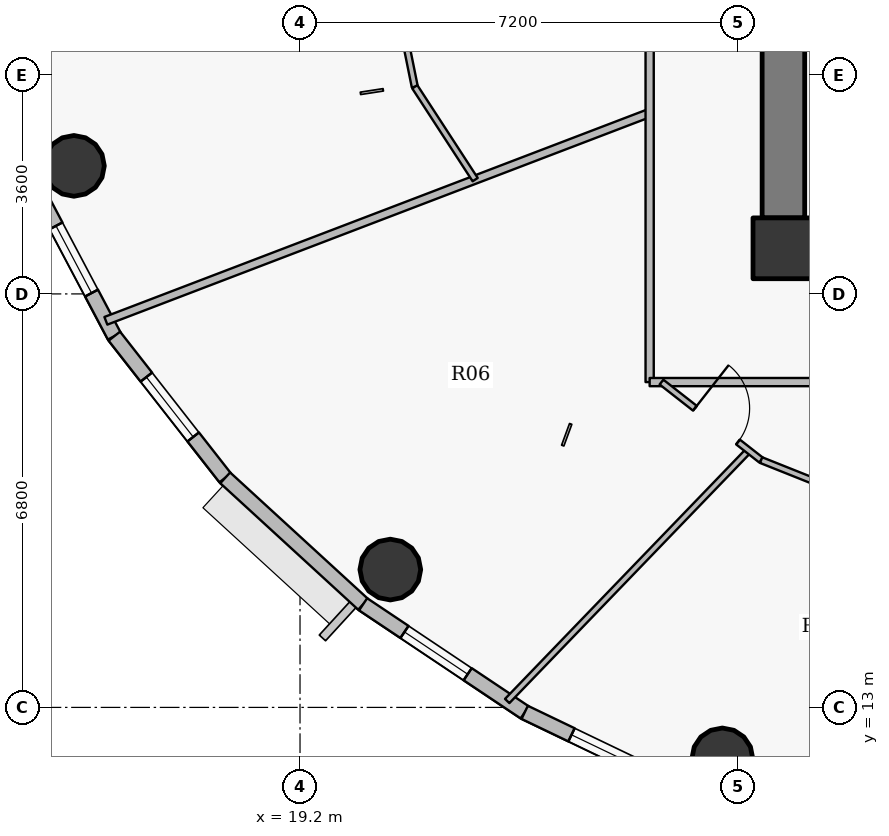
"""IFC4 building model, lengths in metres.
Left out: names, types, materials, properties, quantities, classifications, styles, units other than length and angle.
Written with IfcOpenShell. Run it as: python <this file> out.ifc"""

import sys

from ifc_helpers import new_model, si_unit, direction, frame, frame_2d, origin, origin_2d, place, context, subcontext, project, spatial, rectangle, hollow_circle, extrude, source, transform, mapped, element, fill, save


model = new_model("IFC4")
c1 = context("Model", 3, precision=1e-05, world=origin(), true_north=direction((0.0, 1.0)))
c2 = subcontext(c1, "Body", "Model", "MODEL_VIEW")
j1 = project(units=[si_unit("LENGTHUNIT", "METRE"), si_unit("PLANEANGLEUNIT", "RADIAN")], contexts=[c1])
p1 = place(None, origin())
s1 = spatial("IfcSite", under=j1, at=p1, CompositionType="ELEMENT")
p2 = place(p1, origin())
s2 = spatial("IfcBuilding", under=s1, at=p2, CompositionType="ELEMENT")
p3 = place(p2, frame((0.0, 0.0, 291.75)))
s3 = spatial("IfcBuildingStorey", under=s2, at=p3, CompositionType="ELEMENT", Elevation=291.75)
p4 = place(p3, frame((27.15, 20.55, 0.0), z_axis=(0.0, 0.0, 1.0), x_axis=(1.0, 0.0, 0.0)))
e1 = element("IfcColumn", 1, at=p4, inside=s3, PredefinedType="COLUMN", context=c2, shape_type="SweptSolid", body=[
    extrude(rectangle(XDim=1.0, YDim=1.0, at=origin_2d()), origin(), (0.0, 0.0, 1.0), 3.75),
])
p5 = place(p3, frame((27.15, 21.05, 0.0), z_axis=(0.0, 0.0, 1.0), x_axis=(0.0, 1.0, 0.0)))
e2 = element("IfcWall", 2, at=p5, inside=s3, PredefinedType="SHEAR", context=c2, shape_type="SweptSolid", body=[
    extrude(rectangle(XDim=11.9, YDim=0.7, at=frame_2d((5.95, 0.0))), origin(), (0.0, 0.0, 1.0), 3.05),
])
for number, where, z_axis, x_axis in (
    (3, (15.481, 21.906, 0.0), (0.0, 0.0, 1.0), (1.0, 0.0, 0.0)),
    (4, (20.685, 15.267, 0.0), (0.0, 0.0, 1.0), (1.0, 0.0, 0.0)),
    (5, (26.146, 12.161, 0.0), (0.0, 0.0, 1.0), (1.0, 0.0, 0.0)),
):
    element("IfcColumn", number, at=place(p3, frame(where, z_axis=z_axis, x_axis=x_axis)), inside=s3, PredefinedType="COLUMN", context=c2, shape_type="SweptSolid", body=[
        extrude(hollow_circle(Radius=0.5, WallThickness=0.032, at=origin_2d()), origin(), (0.0, 0.0, 1.0), 3.75),
    ])
p6 = place(p3, frame((16.146, 19.105, 0.0), z_axis=(0.0, 0.0, 1.0), x_axis=(-0.467628269026, 0.883925224218, 0.0)))
e6 = element("IfcWall", 6, at=p6, inside=s3, PredefinedType="SOLIDWALL", context=c2, shape_type="SweptSolid", body=[
    extrude(rectangle(XDim=2.854, YDim=0.24, at=frame_2d((1.427, 0.0))), origin(), (0.0, 0.0, 1.0), 3.5),
])
p7 = place(p6, frame((0.802, 0.0, 0.9)))
e7 = element("IfcOpeningElement", 7, at=p7, cuts=e6, PredefinedType="OPENING", context=c2, shape_type="SweptSolid", body=[
    extrude(rectangle(XDim=1.25, YDim=1.65, at=origin_2d()), frame((0.625, 0.13, 0.825), z_axis=(0.0, -1.0, 0.0), x_axis=(1.0, 0.0, 0.0)), (0.0, 0.0, 1.0), 0.26),
])
p8 = place(p3, frame((17.97, 16.775, 0.0), z_axis=(0.0, 0.0, 1.0), x_axis=(-0.616337186556, 0.787482363275, 0.0)))
e8 = element("IfcWall", 8, at=p8, inside=s3, PredefinedType="SOLIDWALL", context=c2, shape_type="SweptSolid", body=[
    extrude(rectangle(XDim=2.958, YDim=0.24, at=frame_2d((1.479, 0.0))), origin(), (0.0, 0.0, 1.0), 3.5),
])
p9 = place(p8, frame((0.854, 0.0, 0.9)))
e9 = element("IfcOpeningElement", 9, at=p9, cuts=e8, PredefinedType="OPENING", context=c2, shape_type="SweptSolid", body=[
    extrude(rectangle(XDim=1.25, YDim=1.65, at=origin_2d()), frame((0.625, 0.13, 0.825), z_axis=(0.0, -1.0, 0.0), x_axis=(1.0, 0.0, 0.0)), (0.0, 0.0, 1.0), 0.26),
])
p10 = place(p3, frame((20.238, 14.696, 0.0), z_axis=(0.0, 0.0, 1.0), x_axis=(-0.737068506972, 0.675818034703, 0.0)))
e10 = element("IfcWall", 10, at=p10, inside=s3, PredefinedType="SOLIDWALL", context=c2, shape_type="SweptSolid", body=[
    extrude(rectangle(XDim=3.077, YDim=0.24, at=frame_2d((1.539, 0.0))), origin(), (0.0, 0.0, 1.0), 3.5),
])
p11 = place(p3, frame((22.896, 12.918, 0.0), z_axis=(0.0, 0.0, 1.0), x_axis=(-0.831250592635, 0.55589787933, 0.0)))
e11 = element("IfcWall", 11, at=p11, inside=s3, PredefinedType="SOLIDWALL", context=c2, shape_type="SweptSolid", body=[
    extrude(rectangle(XDim=3.197, YDim=0.24, at=frame_2d((1.599, 0.0))), origin(), (0.0, 0.0, 1.0), 3.5),
])
p12 = place(p11, frame((1.129, 0.0, 0.9)))
e12 = element("IfcOpeningElement", 12, at=p12, cuts=e11, PredefinedType="OPENING", context=c2, shape_type="SweptSolid", body=[
    extrude(rectangle(XDim=1.25, YDim=1.65, at=origin_2d()), frame((0.625, 0.13, 0.825), z_axis=(0.0, -1.0, 0.0), x_axis=(1.0, 0.0, 0.0)), (0.0, 0.0, 1.0), 0.26),
])
p13 = place(p3, frame((25.877, 11.488, 0.0), z_axis=(0.0, 0.0, 1.0), x_axis=(-0.901573741254, 0.43262546051, 0.0)))
e13 = element("IfcWall", 13, at=p13, inside=s3, PredefinedType="SOLIDWALL", context=c2, shape_type="SweptSolid", body=[
    extrude(rectangle(XDim=3.307, YDim=0.24, at=frame_2d((1.653, 0.0))), origin(), (0.0, 0.0, 1.0), 3.5),
])
p14 = place(p13, frame((0.853, 0.0, 0.9)))
e14 = element("IfcOpeningElement", 14, at=p14, cuts=e13, PredefinedType="OPENING", context=c2, shape_type="SweptSolid", body=[
    extrude(rectangle(XDim=1.6, YDim=1.75, at=origin_2d()), frame((0.8, 0.13, 0.875), z_axis=(0.0, -1.0, 0.0), x_axis=(1.0, 0.0, 0.0)), (0.0, 0.0, 1.0), 0.26),
])
p15 = place(p3, frame((16.007, 19.358, 0.0), z_axis=(0.0, 0.0, 1.0), x_axis=(0.934094110355, 0.35702687994, 0.0)))
e15 = element("IfcWall", 15, at=p15, inside=s3, PredefinedType="PARTITIONING", context=c2, shape_type="SweptSolid", body=[
    extrude(rectangle(XDim=9.574, YDim=0.135, at=frame_2d((4.787, 0.0))), origin(), (0.0, 0.0, 1.0), 2.985),
])
p16 = place(p3, frame((20.32, 27.0, 0.0), z_axis=(0.0, 0.0, 1.0), x_axis=(0.198226068862, -0.980156327135, 0.0)))
e16 = element("IfcWall", 16, at=p16, inside=s3, PredefinedType="PARTITIONING", context=c2, shape_type="SweptSolid", body=[
    extrude(rectangle(XDim=3.871, YDim=0.1, at=frame_2d((1.936, 0.0))), origin(), (0.0, 0.0, 1.0), 3.035),
])
p17 = place(p3, frame((21.087, 23.206, 0.0), z_axis=(0.0, 0.0, 1.0), x_axis=(0.545384128846, -0.838186227519, 0.0)))
e17 = element("IfcWall", 17, at=p17, inside=s3, PredefinedType="PARTITIONING", context=c2, shape_type="SweptSolid", body=[
    extrude(rectangle(XDim=1.821, YDim=0.1, at=frame_2d((0.911, 0.0))), origin(), (0.0, 0.0, 1.0), 3.035),
])
p18 = place(p3, frame((22.607, 13.105, 0.0), z_axis=(0.0, 0.0, 1.0), x_axis=(0.693978480191, 0.71999574237, 0.0)))
e18 = element("IfcWall", 18, at=p18, inside=s3, PredefinedType="PARTITIONING", context=c2, shape_type="SweptSolid", body=[
    extrude(rectangle(XDim=5.724, YDim=0.1, at=frame_2d((2.862, 0.0))), origin(), (0.0, 0.0, 1.0), 2.985),
])
p19 = place(p3, frame((24.95, 18.35, 0.0), z_axis=(0.0, 0.0, 1.0), x_axis=(0.0, 1.0, 0.0)))
e19 = element("IfcWall", 19, at=p19, inside=s3, PredefinedType="PARTITIONING", context=c2, shape_type="SweptSolid", body=[
    extrude(rectangle(XDim=11.45, YDim=0.135, at=frame_2d((5.725, 0.0))), origin(), (0.0, 0.0, 1.0), 3.035),
])
p20 = place(p19, frame((7.418, 0.0, 0.0)))
e20 = element("IfcOpeningElement", 20, at=p20, cuts=e19, PredefinedType="OPENING", context=c2, shape_type="SweptSolid", body=[
    extrude(rectangle(XDim=1.0, YDim=2.15, at=origin_2d()), frame((0.5, 0.078, 1.075), z_axis=(0.0, -1.0, 0.0), x_axis=(1.0, 0.0, 0.0)), (0.0, 0.0, 1.0), 0.155),
])
p21 = place(p3, frame((24.95, 18.35, 0.0), z_axis=(0.0, 0.0, 1.0), x_axis=(1.0, 0.0, 0.0)))
e21 = element("IfcWall", 21, at=p21, inside=s3, PredefinedType="PARTITIONING", context=c2, shape_type="SweptSolid", body=[
    extrude(rectangle(XDim=22.1, YDim=0.135, at=frame_2d((11.05, 0.0))), origin(), (0.0, 0.0, 1.0), 3.035),
])
p22 = place(p21, frame((6.49, 0.0, 0.0)))
e22 = element("IfcOpeningElement", 22, at=p22, cuts=e21, PredefinedType="OPENING", context=c2, shape_type="SweptSolid", body=[
    extrude(rectangle(XDim=1.0, YDim=2.15, at=origin_2d()), frame((0.5, 0.078, 1.075), z_axis=(0.0, -1.0, 0.0), x_axis=(1.0, 0.0, 0.0)), (0.0, 0.0, 1.0), 0.155),
])
p23 = place(p3, frame((25.145, 18.35, 0.0), z_axis=(0.0, 0.0, 1.0), x_axis=(0.787326747019, -0.616535962803, 0.0)))
e23 = element("IfcWall", 23, at=p23, inside=s3, PredefinedType="PARTITIONING", context=c2, shape_type="SweptSolid", body=[
    extrude(rectangle(XDim=2.081, YDim=0.1, at=frame_2d((1.041, 0.0))), origin(), (0.0, 0.0, 1.0), 3.5),
])
p24 = place(p23, frame((0.698, 0.0, 0.0)))
e24 = element("IfcOpeningElement", 24, at=p24, cuts=e23, PredefinedType="OPENING", context=c2, shape_type="SweptSolid", body=[
    extrude(rectangle(XDim=0.9, YDim=2.1, at=origin_2d()), frame((0.45, 0.06, 1.05), z_axis=(0.0, -1.0, 0.0), x_axis=(1.0, 0.0, 0.0)), (0.0, 0.0, 1.0), 0.12),
])
p25 = place(p3, frame((26.783, 17.067, 0.0), z_axis=(0.0, 0.0, 1.0), x_axis=(0.928809047774, -0.370558703544, 0.0)))
e25 = element("IfcWall", 25, at=p25, inside=s3, PredefinedType="PARTITIONING", context=c2, shape_type="SweptSolid", body=[
    extrude(rectangle(XDim=4.706, YDim=0.1, at=frame_2d((2.353, 0.0))), origin(), (0.0, 0.0, 1.0), 3.035),
])
p26 = place(p3, frame((26.8, 21.04, 0.0), z_axis=(0.0, 0.0, 1.0), x_axis=(0.0, -1.0, 0.0)))
e26 = element("IfcWall", 26, at=p26, inside=s3, PredefinedType="PARTITIONING", context=c2, shape_type="SweptSolid", body=[
    extrude(rectangle(XDim=0.84, YDim=0.135, at=frame_2d((0.42, 0.0))), origin(), (0.0, 0.0, 1.0), 3.035),
])
p27 = place(p3, frame((27.107, 20.2, 0.0), z_axis=(0.0, 0.0, 1.0), x_axis=(1.0, 0.0, 0.0)))
e27 = element("IfcWall", 27, at=p27, inside=s3, PredefinedType="PARTITIONING", context=c2, shape_type="SweptSolid", body=[
    extrude(rectangle(XDim=0.532, YDim=0.135, at=frame_2d((0.266, 0.0))), origin(), (0.0, 0.0, 1.0), 3.035),
])
m1 = source(origin(), c2, "Body", "SweptSolid", [
    extrude(rectangle(XDim=1.25, YDim=1.65, at=origin_2d()), frame((0.625, 0.03, 0.825), z_axis=(0.0, -1.0, 0.0), x_axis=(1.0, 0.0, 0.0)), (0.0, 0.0, 1.0), 0.06),
])
p28 = place(p9, origin())
e28 = element("IfcWindow", 28, at=p28, inside=s3, PartitioningType="SINGLE_PANEL", PredefinedType="WINDOW", context=c2, shape_type="MappedRepresentation", body=[
    mapped(m1, transform((0.0, 0.0, 0.0), x_axis=(1.0, 0.0, 0.0), y_axis=(0.0, 1.0, 0.0), z_axis=(0.0, 0.0, 1.0), scale=1.0)),
])
fill(e9, e28)
p29 = place(p12, origin())
e29 = element("IfcWindow", 29, at=p29, inside=s3, PartitioningType="SINGLE_PANEL", PredefinedType="WINDOW", context=c2, shape_type="MappedRepresentation", body=[
    mapped(m1, transform((0.0, 0.0, 0.0), x_axis=(1.0, 0.0, 0.0), y_axis=(0.0, 1.0, 0.0), z_axis=(0.0, 0.0, 1.0), scale=1.0)),
])
fill(e12, e29)
m2 = source(origin(), c2, "Body", "SweptSolid", [
    extrude(rectangle(XDim=1.6, YDim=1.75, at=origin_2d()), frame((0.8, 0.03, 0.875), z_axis=(0.0, -1.0, 0.0), x_axis=(1.0, 0.0, 0.0)), (0.0, 0.0, 1.0), 0.06),
])
p30 = place(p14, origin())
e30 = element("IfcWindow", 30, at=p30, inside=s3, PartitioningType="DOUBLE_PANEL_VERTICAL", PredefinedType="WINDOW", context=c2, shape_type="MappedRepresentation", body=[
    mapped(m2, transform((0.0, 0.0, 0.0), x_axis=(1.0, 0.0, 0.0), y_axis=(0.0, 1.0, 0.0), z_axis=(0.0, 0.0, 1.0), scale=1.0)),
])
fill(e14, e30)
p31 = place(p7, origin())
e31 = element("IfcWindow", 31, at=p31, inside=s3, PartitioningType="SINGLE_PANEL", PredefinedType="WINDOW", context=c2, shape_type="MappedRepresentation", body=[
    mapped(m1, transform((0.0, 0.0, 0.0), x_axis=(1.0, 0.0, 0.0), y_axis=(0.0, 1.0, 0.0), z_axis=(0.0, 0.0, 1.0), scale=1.0)),
])
fill(e7, e31)
m3 = source(origin(), c2, "Body", "SweptSolid", [
    extrude(rectangle(XDim=0.9, YDim=2.1, at=origin_2d()), frame((0.45, 0.025, 1.05), z_axis=(0.0, -1.0, 0.0), x_axis=(1.0, 0.0, 0.0)), (0.0, 0.0, 1.0), 0.05),
])
p32 = place(p24, origin())
e32 = element("IfcDoor", 32, at=p32, inside=s3, OperationType="SINGLE_SWING_LEFT", PredefinedType="DOOR", context=c2, shape_type="MappedRepresentation", body=[
    mapped(m3, transform((0.0, 0.0, 0.0), x_axis=(1.0, 0.0, 0.0), y_axis=(0.0, 1.0, 0.0), z_axis=(0.0, 0.0, 1.0), scale=1.0)),
])
fill(e24, e32)
save(model, sys.argv[1])
